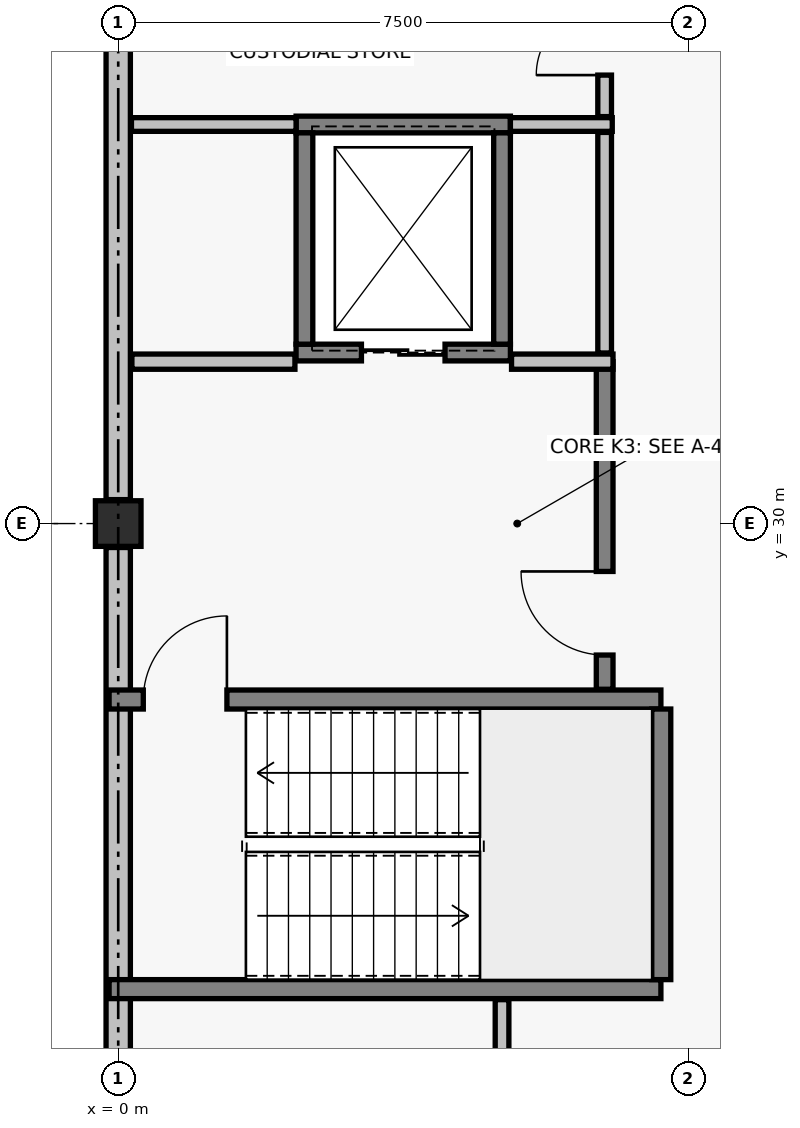
"""IFC4 building model, lengths in metres.
Left out: names, types, materials, properties, quantities, classifications, styles, units other than length and angle.
Written with IfcOpenShell. Run it as: python <this file> out.ifc"""

import sys

from ifc_helpers import new_model, si_unit, direction, frame, frame_2d, origin, origin_2d, place, context, subcontext, project, spatial, rectangle, extrude, element, fill, save


model = new_model("IFC4")
c1 = context("Model", 3, precision=1e-05, world=origin(), true_north=direction((0.0, 1.0)))
c2 = subcontext(c1, "Body", "Model", "MODEL_VIEW")
j1 = project(units=[si_unit("LENGTHUNIT", "METRE"), si_unit("PLANEANGLEUNIT", "RADIAN")], contexts=[c1])
p1 = place(None, origin())
s1 = spatial("IfcSite", under=j1, at=p1, CompositionType="ELEMENT")
p2 = place(p1, origin())
s2 = spatial("IfcBuilding", under=s1, at=p2, CompositionType="ELEMENT")
p3 = place(p2, frame((0.0, 0.0, 9.0)))
s3 = spatial("IfcBuildingStorey", under=s2, at=p3, CompositionType="ELEMENT", Elevation=9.0)
p4 = place(p3, frame((0.0, 30.0, 0.0), z_axis=(0.0, 0.0, 1.0), x_axis=(1.0, 0.0, 0.0)))
e1 = element("IfcColumn", 1, at=p4, inside=s3, PredefinedType="COLUMN", context=c2, shape_type="SweptSolid", body=[
    extrude(rectangle(XDim=0.6, YDim=0.6, at=origin_2d()), origin(), (0.0, 0.0, 1.0), 4.2),
])
for number, where, z_axis, x_axis in (
    (2, (0.0, 22.815, 0.0), (0.0, 0.0, 1.0), (0.0, 1.0, 0.0)),
    (3, (0.0, 30.315, 0.0), (0.0, 0.0, 1.0), (0.0, 1.0, 0.0)),
):
    element("IfcWall", number, at=place(p3, frame(where, z_axis=z_axis, x_axis=x_axis)), inside=s3, PredefinedType="SOLIDWALL", context=c2, shape_type="SweptSolid", body=[
        extrude(rectangle(XDim=6.87, YDim=0.32, at=frame_2d((3.435, 0.0))), origin(), (0.0, 0.0, 1.0), 2.87),
    ])
p5 = place(p3, frame((-0.12, 23.875, 0.0), z_axis=(0.0, 0.0, 1.0), x_axis=(1.0, 0.0, 0.0)))
e4 = element("IfcWall", 4, at=p5, inside=s3, PredefinedType="SOLIDWALL", context=c2, shape_type="SweptSolid", body=[
    extrude(rectangle(XDim=7.26, YDim=0.25, at=frame_2d((3.63, 0.0))), origin(), (0.0, 0.0, 1.0), 3.92),
])
p6 = place(p3, frame((-0.12, 27.685, 0.0), z_axis=(0.0, 0.0, 1.0), x_axis=(1.0, 0.0, 0.0)))
e5 = element("IfcWall", 5, at=p6, inside=s3, PredefinedType="SOLIDWALL", context=c2, shape_type="SweptSolid", body=[
    extrude(rectangle(XDim=7.26, YDim=0.25, at=frame_2d((3.63, 0.0))), origin(), (0.0, 0.0, 1.0), 3.92),
])
p7 = place(p6, frame((0.45, 0.0, 0.0)))
e6 = element("IfcOpeningElement", 6, at=p7, cuts=e5, PredefinedType="OPENING", context=c2, shape_type="SweptSolid", body=[
    extrude(rectangle(XDim=1.1, YDim=2.15, at=frame_2d((0.55, 1.075))), frame((0.0, 0.135, 0.0), z_axis=(0.0, -1.0, 0.0), x_axis=(1.0, 0.0, 0.0)), (0.0, 0.0, 1.0), 0.27),
])
p8 = place(p3, frame((7.145, 24.0, 0.0), z_axis=(0.0, 0.0, 1.0), x_axis=(0.0, 1.0, 0.0)))
e7 = element("IfcWall", 7, at=p8, inside=s3, PredefinedType="SOLIDWALL", context=c2, shape_type="SweptSolid", body=[
    extrude(rectangle(XDim=3.56, YDim=0.25, at=frame_2d((1.78, 0.0))), origin(), (0.0, 0.0, 1.0), 3.92),
])
p9 = place(p3, frame((2.34, 32.25, 0.0), z_axis=(0.0, 0.0, 1.0), x_axis=(1.0, 0.0, 0.0)))
e8 = element("IfcWall", 8, at=p9, inside=s3, PredefinedType="SOLIDWALL", context=c2, shape_type="SweptSolid", body=[
    extrude(rectangle(XDim=2.82, YDim=0.22, at=frame_2d((1.41, 0.0))), origin(), (0.0, 0.0, 1.0), 3.92),
])
p10 = place(p9, frame((0.86, 0.0, 0.0)))
e9 = element("IfcOpeningElement", 9, at=p10, cuts=e8, PredefinedType="OPENING", context=c2, shape_type="SweptSolid", body=[
    extrude(rectangle(XDim=1.1, YDim=2.15, at=frame_2d((0.55, 1.075))), frame((0.0, 0.12, 0.0), z_axis=(0.0, -1.0, 0.0), x_axis=(1.0, 0.0, 0.0)), (0.0, 0.0, 1.0), 0.24),
])
p11 = place(p3, frame((2.34, 35.25, 0.0), z_axis=(0.0, 0.0, 1.0), x_axis=(1.0, 0.0, 0.0)))
e10 = element("IfcWall", 10, at=p11, inside=s3, PredefinedType="SOLIDWALL", context=c2, shape_type="SweptSolid", body=[
    extrude(rectangle(XDim=2.82, YDim=0.22, at=frame_2d((1.41, 0.0))), origin(), (0.0, 0.0, 1.0), 3.92),
])
for number, where, z_axis, x_axis in (
    (11, (2.45, 32.36, 0.0), (0.0, 0.0, 1.0), (0.0, 1.0, 0.0)),
    (12, (5.05, 32.36, 0.0), (0.0, 0.0, 1.0), (0.0, 1.0, 0.0)),
):
    element("IfcWall", number, at=place(p3, frame(where, z_axis=z_axis, x_axis=x_axis)), inside=s3, PredefinedType="SOLIDWALL", context=c2, shape_type="SweptSolid", body=[
        extrude(rectangle(XDim=2.78, YDim=0.22, at=frame_2d((1.39, 0.0))), origin(), (0.0, 0.0, 1.0), 3.92),
    ])
p12 = place(p3, frame((6.4, 27.82, 0.0), z_axis=(0.0, 0.0, 1.0), x_axis=(0.0, 1.0, 0.0)))
e13 = element("IfcWall", 13, at=p12, inside=s3, PredefinedType="SOLIDWALL", context=c2, shape_type="SweptSolid", body=[
    extrude(rectangle(XDim=4.31, YDim=0.22, at=frame_2d((2.155, 0.0))), origin(), (0.0, 0.0, 1.0), 3.92),
])
p13 = place(p12, frame((0.45, 0.0, 0.0)))
e14 = element("IfcOpeningElement", 14, at=p13, cuts=e13, PredefinedType="OPENING", context=c2, shape_type="SweptSolid", body=[
    extrude(rectangle(XDim=1.1, YDim=2.15, at=frame_2d((0.55, 1.075))), frame((0.0, 0.12, 0.0), z_axis=(0.0, -1.0, 0.0), x_axis=(1.0, 0.0, 0.0)), (0.0, 0.0, 1.0), 0.24),
])
p14 = place(p3, frame((0.18, 32.13, 0.0), z_axis=(0.0, 0.0, 1.0), x_axis=(1.0, 0.0, 0.0)))
e15 = element("IfcWall", 15, at=p14, inside=s3, PredefinedType="PARTITIONING", context=c2, shape_type="SweptSolid", body=[
    extrude(rectangle(XDim=2.145, YDim=0.2, at=frame_2d((1.073, 0.0))), origin(), (0.0, 0.0, 1.0), 3.13),
])
p15 = place(p3, frame((5.175, 32.13, 0.0), z_axis=(0.0, 0.0, 1.0), x_axis=(1.0, 0.0, 0.0)))
e16 = element("IfcWall", 16, at=p15, inside=s3, PredefinedType="PARTITIONING", context=c2, shape_type="SweptSolid", body=[
    extrude(rectangle(XDim=1.335, YDim=0.2, at=frame_2d((0.667, 0.0))), origin(), (0.0, 0.0, 1.0), 3.33),
])
p16 = place(p3, frame((5.05, 20.274, 0.0), z_axis=(0.0, 0.0, 1.0), x_axis=(0.0, 1.0, 0.0)))
e17 = element("IfcWall", 17, at=p16, inside=s3, PredefinedType="PARTITIONING", context=c2, shape_type="SweptSolid", body=[
    extrude(rectangle(XDim=3.462, YDim=0.18, at=frame_2d((1.731, 0.0))), origin(), (0.0, 0.0, 1.0), 2.87),
])
p17 = place(p3, frame((0.174, 35.25, 0.0), z_axis=(0.0, 0.0, 1.0), x_axis=(1.0, 0.0, 0.0)))
e18 = element("IfcWall", 18, at=p17, inside=s3, PredefinedType="PARTITIONING", context=c2, shape_type="SweptSolid", body=[
    extrude(rectangle(XDim=2.166, YDim=0.18, at=frame_2d((1.083, 0.0))), origin(), (0.0, 0.0, 1.0), 3.12),
])
p18 = place(p3, frame((5.16, 35.25, 0.0), z_axis=(0.0, 0.0, 1.0), x_axis=(1.0, 0.0, 0.0)))
e19 = element("IfcWall", 19, at=p18, inside=s3, PredefinedType="PARTITIONING", context=c2, shape_type="SweptSolid", body=[
    extrude(rectangle(XDim=1.34, YDim=0.18, at=frame_2d((0.67, 0.0))), origin(), (0.0, 0.0, 1.0), 3.27),
])
p19 = place(p3, frame((6.4, 32.244, 0.0), z_axis=(0.0, 0.0, 1.0), x_axis=(0.0, 1.0, 0.0)))
e20 = element("IfcWall", 20, at=p19, inside=s3, PredefinedType="PARTITIONING", context=c2, shape_type="SweptSolid", body=[
    extrude(rectangle(XDim=2.902, YDim=0.18, at=frame_2d((1.451, 0.0))), origin(), (0.0, 0.0, 1.0), 3.27),
])
p20 = place(p3, frame((6.4, 35.354, 0.0), z_axis=(0.0, 0.0, 1.0), x_axis=(0.0, 1.0, 0.0)))
e21 = element("IfcWall", 21, at=p20, inside=s3, PredefinedType="PARTITIONING", context=c2, shape_type="SweptSolid", body=[
    extrude(rectangle(XDim=2.052, YDim=0.18, at=frame_2d((1.026, 0.0))), origin(), (0.0, 0.0, 1.0), 2.87),
])
p21 = place(p20, frame((0.546, 0.0, 0.0)))
e22 = element("IfcOpeningElement", 22, at=p21, cuts=e21, PredefinedType="OPENING", context=c2, shape_type="SweptSolid", body=[
    extrude(rectangle(XDim=0.9, YDim=2.1, at=frame_2d((0.45, 1.05))), frame((0.0, 0.1, 0.0), z_axis=(0.0, -1.0, 0.0), x_axis=(1.0, 0.0, 0.0)), (0.0, 0.0, 1.0), 0.2),
])
p22 = place(p7, origin())
e23 = element("IfcDoor", 23, at=p22, inside=s3, OperationType="SINGLE_SWING_RIGHT", PredefinedType="DOOR", context=c2, shape_type="SweptSolid", body=[
    extrude(rectangle(XDim=1.1, YDim=2.15, at=frame_2d((0.55, 1.075))), frame((0.0, 0.025, 0.0), z_axis=(0.0, -1.0, 0.0), x_axis=(1.0, 0.0, 0.0)), (0.0, 0.0, 1.0), 0.05),
])
fill(e6, e23)
p23 = place(p10, origin())
e24 = element("IfcDoor", 24, at=p23, inside=s3, OperationType="SLIDING_TO_LEFT", PredefinedType="DOOR", context=c2, shape_type="SweptSolid", body=[
    extrude(rectangle(XDim=1.1, YDim=2.15, at=frame_2d((0.55, 1.075))), frame((0.0, 0.025, 0.0), z_axis=(0.0, -1.0, 0.0), x_axis=(1.0, 0.0, 0.0)), (0.0, 0.0, 1.0), 0.05),
])
fill(e9, e24)
p24 = place(p13, origin())
e25 = element("IfcDoor", 25, at=p24, inside=s3, OperationType="SINGLE_SWING_RIGHT", PredefinedType="DOOR", context=c2, shape_type="SweptSolid", body=[
    extrude(rectangle(XDim=1.1, YDim=2.15, at=frame_2d((0.55, 1.075))), frame((0.0, 0.025, 0.0), z_axis=(0.0, -1.0, 0.0), x_axis=(1.0, 0.0, 0.0)), (0.0, 0.0, 1.0), 0.05),
])
fill(e14, e25)
p25 = place(p21, origin())
e26 = element("IfcDoor", 26, at=p25, inside=s3, OperationType="SINGLE_SWING_LEFT", PredefinedType="DOOR", context=c2, shape_type="SweptSolid", body=[
    extrude(rectangle(XDim=0.9, YDim=2.1, at=frame_2d((0.45, 1.05))), frame((0.0, 0.025, 0.0), z_axis=(0.0, -1.0, 0.0), x_axis=(1.0, 0.0, 0.0)), (0.0, 0.0, 1.0), 0.05),
])
fill(e22, e26)
save(model, sys.argv[1])
